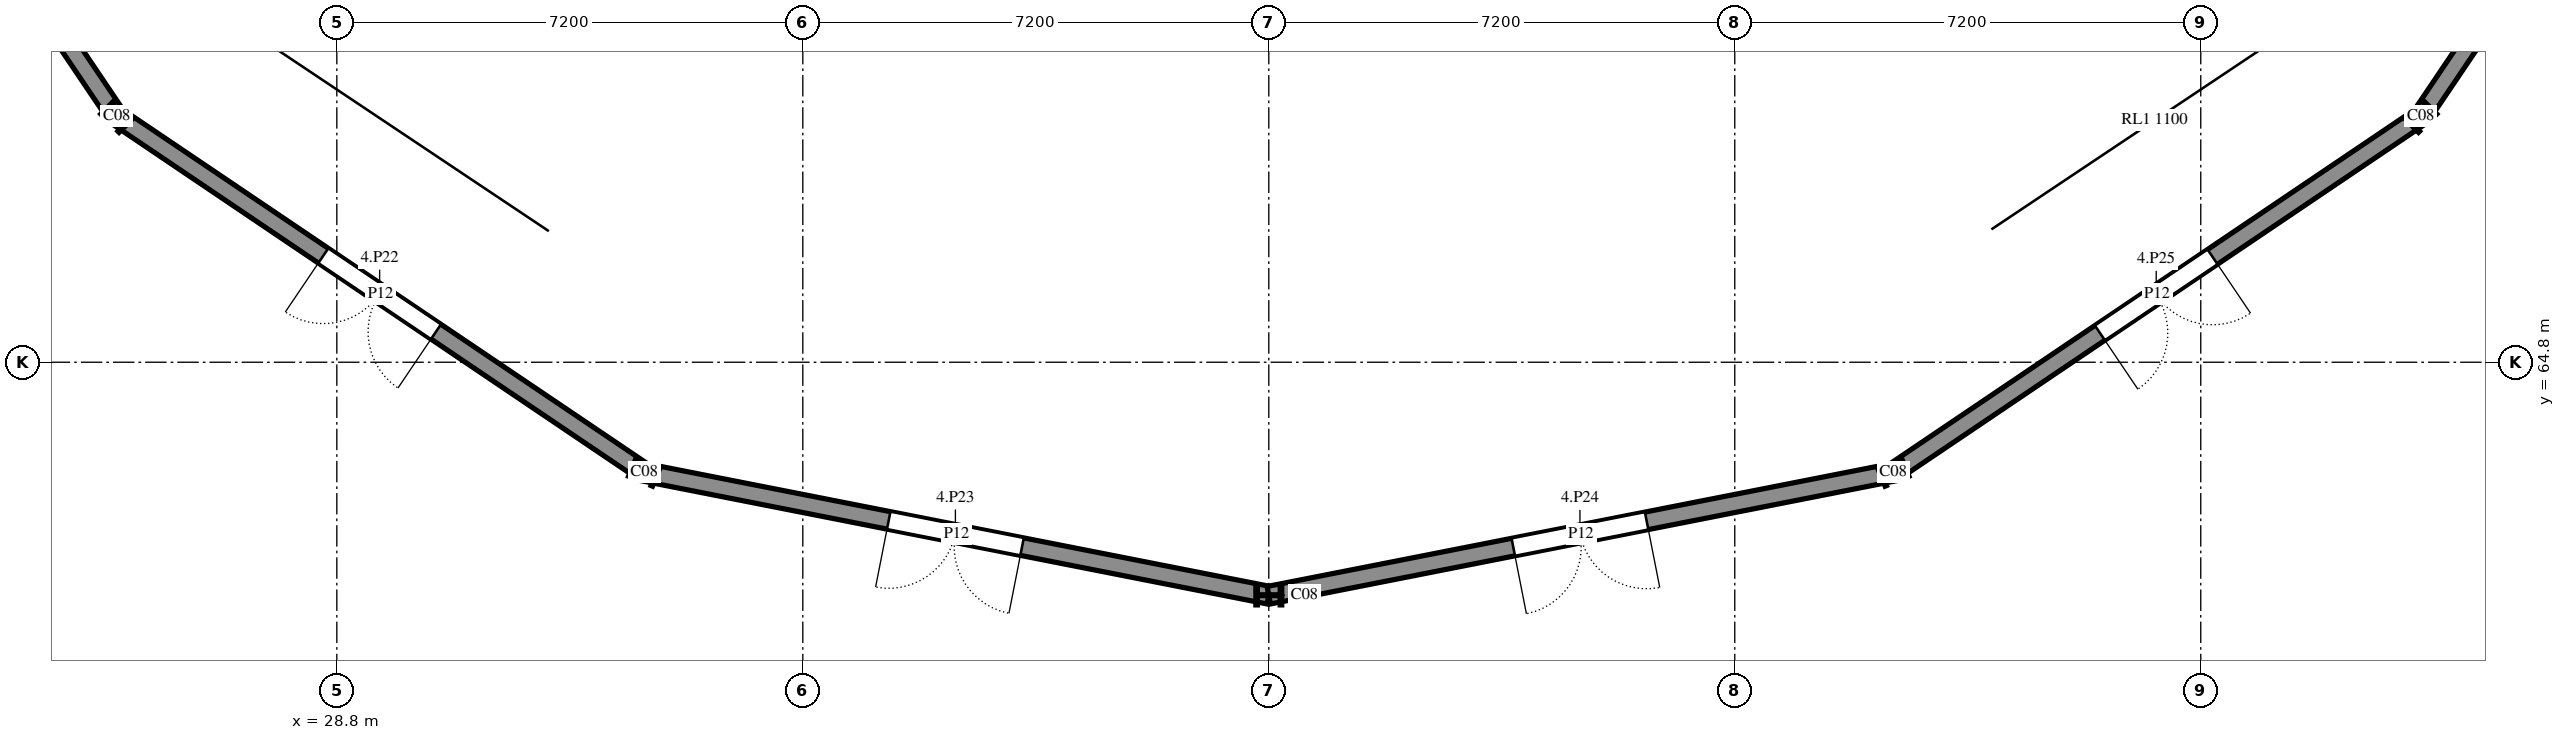
"""IFC4 building model, lengths in metres.
Left out: names, types, materials, properties, quantities, classifications, styles, units other than length and angle.
Written with IfcOpenShell. Run it as: python <this file> out.ifc"""

import sys

from ifc_helpers import new_model, si_unit, direction, frame, frame_2d, origin, origin_2d, place, context, subcontext, project, spatial, rectangle, i_section, extrude, element, fill, save


model = new_model("IFC4")
c1 = context("Model", 3, precision=1e-05, world=origin(), true_north=direction((0.0, 1.0)))
c2 = subcontext(c1, "Body", "Model", "MODEL_VIEW")
j1 = project(units=[si_unit("LENGTHUNIT", "METRE"), si_unit("PLANEANGLEUNIT", "RADIAN")], contexts=[c1])
p1 = place(None, origin())
s1 = spatial("IfcSite", under=j1, at=p1, CompositionType="ELEMENT")
p2 = place(p1, origin())
s2 = spatial("IfcBuilding", under=s1, at=p2, CompositionType="ELEMENT")
p3 = place(p2, frame((0.0, 0.0, 14.4)))
s3 = spatial("IfcBuildingStorey", under=s2, at=p3, CompositionType="ELEMENT", Elevation=14.4)
for number, where, z_axis, x_axis in (
    (1, (25.4, 68.6, 0.0), (0.0, 0.0, 1.0), (-0.707, -0.707, 0.0)),
    (2, (33.55, 63.1, 0.0), (0.0, 0.0, 1.0), (-0.383, -0.924, 0.0)),
    (3, (43.2, 61.2, 0.0), (0.0, 0.0, 1.0), (0.0, -1.0, 0.0)),
    (4, (52.85, 63.1, 0.0), (0.0, 0.0, 1.0), (0.383, -0.924, 0.0)),
    (5, (61.0, 68.6, 0.0), (0.0, 0.0, 1.0), (0.707, -0.707, 0.0)),
):
    element("IfcColumn", number, at=place(p3, frame(where, z_axis=z_axis, x_axis=x_axis)), inside=s3, PredefinedType="COLUMN", context=c2, shape_type="SweptSolid", body=[
        extrude(i_section(OverallWidth=0.3, OverallDepth=0.4, WebThickness=0.013, FlangeThickness=0.024, FilletRadius=0.027, at=origin_2d()), origin(), (0.0, 0.0, 1.0), 3.6),
    ])
p4 = place(p3, frame((19.9, 76.75, 0.0), z_axis=(0.0, 0.0, 1.0), x_axis=(0.559390118145, -0.828904515443, 0.0)))
e6 = element("IfcWall", 6, at=p4, inside=s3, PredefinedType="PARTITIONING", context=c2, shape_type="SweptSolid", body=[
    extrude(rectangle(XDim=9.832, YDim=0.275, at=frame_2d((4.916, 0.0))), origin(), (0.0, 0.0, 1.0), 3.07),
])
p5 = place(p4, frame((3.85, 0.0, 0.0)))
e7 = element("IfcOpeningElement", 7, at=p5, cuts=e6, PredefinedType="OPENING", context=c2, shape_type="SweptSolid", body=[
    extrude(rectangle(XDim=2.1, YDim=2.4, at=frame_2d((1.05, 1.2))), frame((0.0, 0.147, 0.0), z_axis=(0.0, -1.0, 0.0), x_axis=(1.0, 0.0, 0.0)), (0.0, 0.0, 1.0), 0.295),
])
p6 = place(p3, frame((25.4, 68.6, 0.0), z_axis=(0.0, 0.0, 1.0), x_axis=(0.828912285216, -0.559378604719, 0.0)))
e8 = element("IfcWall", 8, at=p6, inside=s3, PredefinedType="PARTITIONING", context=c2, shape_type="SweptSolid", body=[
    extrude(rectangle(XDim=9.832, YDim=0.275, at=frame_2d((4.916, 0.0))), origin(), (0.0, 0.0, 1.0), 3.07),
])
p7 = place(p6, frame((3.85, 0.0, 0.0)))
e9 = element("IfcOpeningElement", 9, at=p7, cuts=e8, PredefinedType="OPENING", context=c2, shape_type="SweptSolid", body=[
    extrude(rectangle(XDim=2.1, YDim=2.4, at=frame_2d((1.05, 1.2))), frame((0.0, 0.147, 0.0), z_axis=(0.0, -1.0, 0.0), x_axis=(1.0, 0.0, 0.0)), (0.0, 0.0, 1.0), 0.295),
])
p8 = place(p3, frame((33.55, 63.1, 0.0), z_axis=(0.0, 0.0, 1.0), x_axis=(0.981159681755, -0.19319854787, 0.0)))
e10 = element("IfcWall", 10, at=p8, inside=s3, PredefinedType="PARTITIONING", context=c2, shape_type="SweptSolid", body=[
    extrude(rectangle(XDim=9.835, YDim=0.275, at=frame_2d((4.917, 0.0))), origin(), (0.0, 0.0, 1.0), 3.07),
])
p9 = place(p8, frame((3.85, 0.0, 0.0)))
e11 = element("IfcOpeningElement", 11, at=p9, cuts=e10, PredefinedType="OPENING", context=c2, shape_type="SweptSolid", body=[
    extrude(rectangle(XDim=2.1, YDim=2.4, at=frame_2d((1.05, 1.2))), frame((0.0, 0.147, 0.0), z_axis=(0.0, -1.0, 0.0), x_axis=(1.0, 0.0, 0.0)), (0.0, 0.0, 1.0), 0.295),
])
p10 = place(p3, frame((43.2, 61.2, 0.0), z_axis=(0.0, 0.0, 1.0), x_axis=(0.981160608262, 0.193193842541, 0.0)))
e12 = element("IfcWall", 12, at=p10, inside=s3, PredefinedType="PARTITIONING", context=c2, shape_type="SweptSolid", body=[
    extrude(rectangle(XDim=9.835, YDim=0.275, at=frame_2d((4.918, 0.0))), origin(), (0.0, 0.0, 1.0), 3.07),
])
p11 = place(p10, frame((3.85, 0.0, 0.0)))
e13 = element("IfcOpeningElement", 13, at=p11, cuts=e12, PredefinedType="OPENING", context=c2, shape_type="SweptSolid", body=[
    extrude(rectangle(XDim=2.1, YDim=2.4, at=frame_2d((1.05, 1.2))), frame((0.0, 0.147, 0.0), z_axis=(0.0, -1.0, 0.0), x_axis=(1.0, 0.0, 0.0)), (0.0, 0.0, 1.0), 0.295),
])
p12 = place(p3, frame((52.85, 63.1, 0.0), z_axis=(0.0, 0.0, 1.0), x_axis=(0.828904515443, 0.559390118145, 0.0)))
e14 = element("IfcWall", 14, at=p12, inside=s3, PredefinedType="PARTITIONING", context=c2, shape_type="SweptSolid", body=[
    extrude(rectangle(XDim=9.832, YDim=0.275, at=frame_2d((4.916, 0.0))), origin(), (0.0, 0.0, 1.0), 3.07),
])
p13 = place(p12, frame((3.85, 0.0, 0.0)))
e15 = element("IfcOpeningElement", 15, at=p13, cuts=e14, PredefinedType="OPENING", context=c2, shape_type="SweptSolid", body=[
    extrude(rectangle(XDim=2.1, YDim=2.4, at=frame_2d((1.05, 1.2))), frame((0.0, 0.147, 0.0), z_axis=(0.0, -1.0, 0.0), x_axis=(1.0, 0.0, 0.0)), (0.0, 0.0, 1.0), 0.295),
])
p14 = place(p3, frame((61.0, 68.6, 0.0), z_axis=(0.0, 0.0, 1.0), x_axis=(0.559390118145, 0.828904515443, 0.0)))
e16 = element("IfcWall", 16, at=p14, inside=s3, PredefinedType="PARTITIONING", context=c2, shape_type="SweptSolid", body=[
    extrude(rectangle(XDim=9.832, YDim=0.275, at=frame_2d((4.916, 0.0))), origin(), (0.0, 0.0, 1.0), 3.07),
])
p15 = place(p14, frame((3.85, 0.0, 0.0)))
e17 = element("IfcOpeningElement", 17, at=p15, cuts=e16, PredefinedType="OPENING", context=c2, shape_type="SweptSolid", body=[
    extrude(rectangle(XDim=2.1, YDim=2.4, at=frame_2d((1.05, 1.2))), frame((0.0, 0.147, 0.0), z_axis=(0.0, -1.0, 0.0), x_axis=(1.0, 0.0, 0.0)), (0.0, 0.0, 1.0), 0.295),
])
p16 = place(p7, frame((2.1, 0.0, 0.0), z_axis=(0.0, 0.0, 1.0), x_axis=(-1.0, 0.0, 0.0)))
e18 = element("IfcDoor", 18, at=p16, inside=s3, OperationType="DOUBLE_DOOR_SINGLE_SWING", PredefinedType="DOOR", context=c2, shape_type="SweptSolid", body=[
    extrude(rectangle(XDim=2.1, YDim=2.4, at=frame_2d((1.05, 1.2))), frame((0.0, 0.025, 0.0), z_axis=(0.0, -1.0, 0.0), x_axis=(1.0, 0.0, 0.0)), (0.0, 0.0, 1.0), 0.05),
])
fill(e9, e18)
p17 = place(p9, frame((2.1, 0.0, 0.0), z_axis=(0.0, 0.0, 1.0), x_axis=(-1.0, 0.0, 0.0)))
e19 = element("IfcDoor", 19, at=p17, inside=s3, OperationType="DOUBLE_DOOR_SINGLE_SWING", PredefinedType="DOOR", context=c2, shape_type="SweptSolid", body=[
    extrude(rectangle(XDim=2.1, YDim=2.4, at=frame_2d((1.05, 1.2))), frame((0.0, 0.025, 0.0), z_axis=(0.0, -1.0, 0.0), x_axis=(1.0, 0.0, 0.0)), (0.0, 0.0, 1.0), 0.05),
])
fill(e11, e19)
p18 = place(p11, frame((2.1, 0.0, 0.0), z_axis=(0.0, 0.0, 1.0), x_axis=(-1.0, 0.0, 0.0)))
e20 = element("IfcDoor", 20, at=p18, inside=s3, OperationType="DOUBLE_DOOR_SINGLE_SWING", PredefinedType="DOOR", context=c2, shape_type="SweptSolid", body=[
    extrude(rectangle(XDim=2.1, YDim=2.4, at=frame_2d((1.05, 1.2))), frame((0.0, 0.025, 0.0), z_axis=(0.0, -1.0, 0.0), x_axis=(1.0, 0.0, 0.0)), (0.0, 0.0, 1.0), 0.05),
])
fill(e13, e20)
p19 = place(p13, frame((2.1, 0.0, 0.0), z_axis=(0.0, 0.0, 1.0), x_axis=(-1.0, 0.0, 0.0)))
e21 = element("IfcDoor", 21, at=p19, inside=s3, OperationType="DOUBLE_DOOR_SINGLE_SWING", PredefinedType="DOOR", context=c2, shape_type="SweptSolid", body=[
    extrude(rectangle(XDim=2.1, YDim=2.4, at=frame_2d((1.05, 1.2))), frame((0.0, 0.025, 0.0), z_axis=(0.0, -1.0, 0.0), x_axis=(1.0, 0.0, 0.0)), (0.0, 0.0, 1.0), 0.05),
])
fill(e15, e21)
save(model, sys.argv[1])
